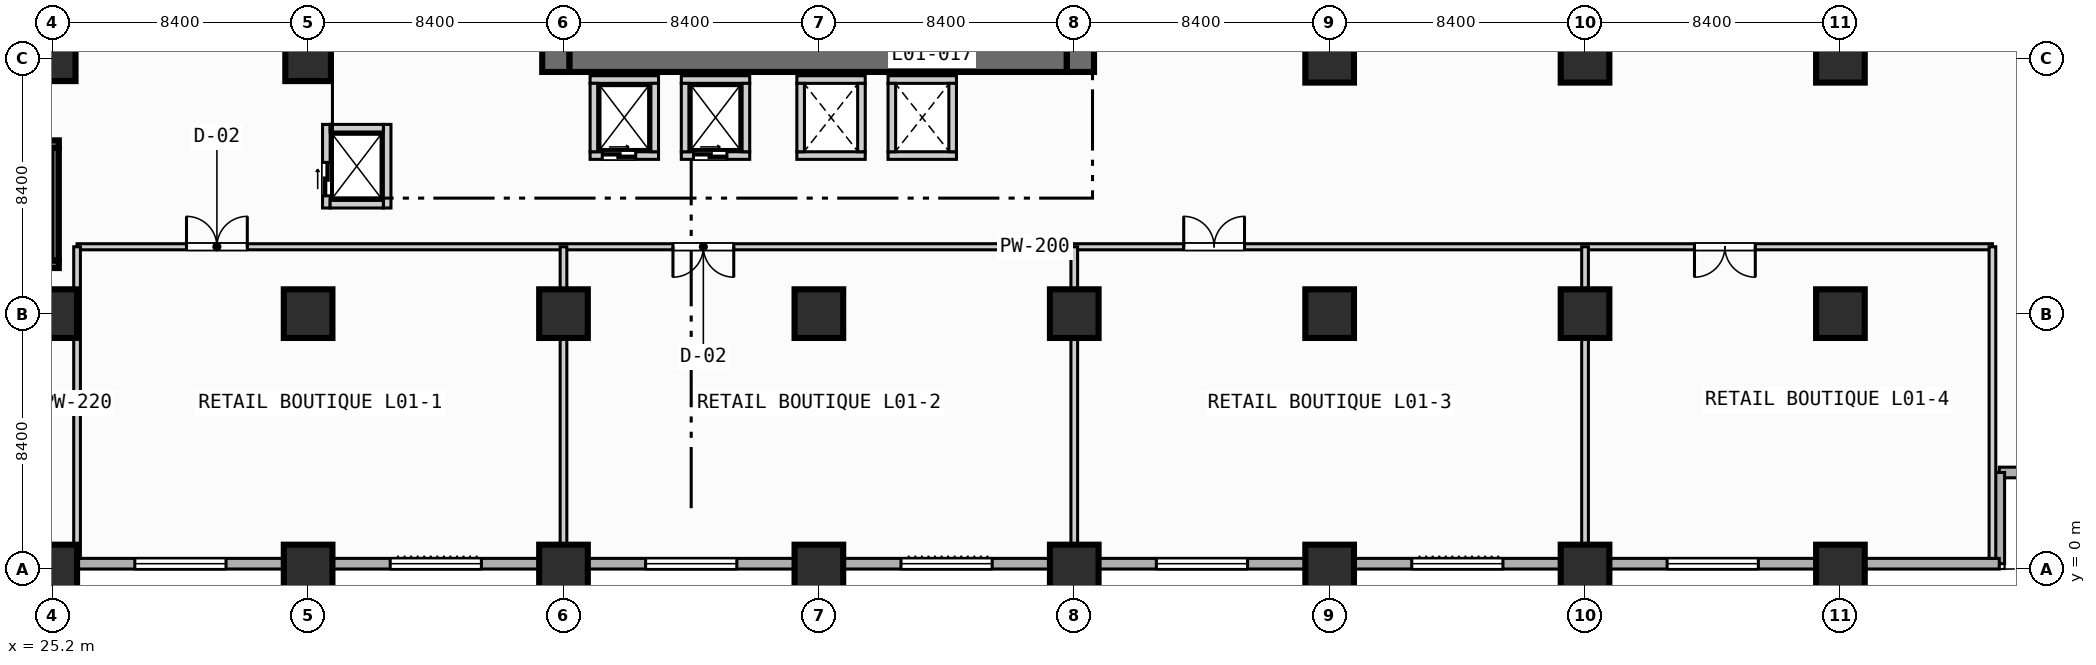
"""IFC4 building model, lengths in metres.
Left out: names, types, materials, properties, quantities, classifications, styles, units other than length and angle.
Written with IfcOpenShell. Run it as: python <this file> out.ifc"""

import sys

from ifc_helpers import new_model, si_unit, direction, frame, frame_2d, origin, origin_2d, place, context, subcontext, project, spatial, rectangle, extrude, element, fill, save


model = new_model("IFC4")
c1 = context("Model", 3, precision=1e-05, world=origin(), true_north=direction((0.0, 1.0)))
c2 = subcontext(c1, "Body", "Model", "MODEL_VIEW")
j1 = project(units=[si_unit("LENGTHUNIT", "METRE"), si_unit("PLANEANGLEUNIT", "RADIAN")], contexts=[c1])
p1 = place(None, origin())
s1 = spatial("IfcSite", under=j1, at=p1, CompositionType="ELEMENT")
p2 = place(p1, origin())
s2 = spatial("IfcBuilding", under=s1, at=p2, CompositionType="ELEMENT")
p3 = place(p2, frame((0.0, 0.0, 6.0)))
s3 = spatial("IfcBuildingStorey", under=s2, at=p3, CompositionType="ELEMENT", Elevation=6.0)
for number, where, z_axis, x_axis in (
    (1, (41.75, 16.35, 0.0), (0.0, 0.0, 1.0), (0.0, 1.0, 0.0)),
    (2, (59.0, 16.35, 0.0), (0.0, 0.0, 1.0), (0.0, 1.0, 0.0)),
):
    element("IfcWall", number, at=place(p3, frame(where, z_axis=z_axis, x_axis=x_axis)), inside=s3, PredefinedType="SHEAR", context=c2, shape_type="SweptSolid", body=[
        extrude(rectangle(XDim=1.65, YDim=0.9, at=frame_2d((0.825, 0.0))), origin(), (0.0, 0.0, 1.0), 4.45),
    ])
p4 = place(p3, frame((42.2, 16.8, 0.0), z_axis=(0.0, 0.0, 1.0), x_axis=(1.0, 0.0, 0.0)))
e3 = element("IfcWall", 3, at=p4, inside=s3, PredefinedType="SHEAR", context=c2, shape_type="SweptSolid", body=[
    extrude(rectangle(XDim=16.35, YDim=0.9, at=frame_2d((8.175, 0.0))), origin(), (0.0, 0.0, 1.0), 4.45),
])
for number, where, z_axis, x_axis in (
    (4, (16.5, 10.025, 0.0), (0.0, 0.0, 1.0), (1.0, 0.0, 0.0)),
    (5, (16.5, 13.975, 0.0), (0.0, 0.0, 1.0), (1.0, 0.0, 0.0)),
):
    element("IfcWall", number, at=place(p3, frame(where, z_axis=z_axis, x_axis=x_axis)), inside=s3, PredefinedType="SOLIDWALL", context=c2, shape_type="SweptSolid", body=[
        extrude(rectangle(XDim=8.9, YDim=0.25, at=frame_2d((4.45, 0.0))), origin(), (0.0, 0.0, 1.0), 4.45),
    ])
p5 = place(p3, frame((25.275, 10.15, 0.0), z_axis=(0.0, 0.0, 1.0), x_axis=(0.0, 1.0, 0.0)))
e6 = element("IfcWall", 6, at=p5, inside=s3, PredefinedType="SOLIDWALL", context=c2, shape_type="SweptSolid", body=[
    extrude(rectangle(XDim=3.7, YDim=0.25, at=frame_2d((1.85, 0.0))), origin(), (0.0, 0.0, 1.0), 4.45),
])
for number, where, z_axis, x_axis in (
    (7, (25.2, 0.0, 0.0), (0.0, 0.0, 1.0), (1.0, 0.0, 0.0)),
    (8, (25.2, 8.4, 0.0), (0.0, 0.0, 1.0), (1.0, 0.0, 0.0)),
):
    element("IfcColumn", number, at=place(p3, frame(where, z_axis=z_axis, x_axis=x_axis)), inside=s3, PredefinedType="COLUMN", context=c2, shape_type="SweptSolid", body=[
        extrude(rectangle(XDim=1.6, YDim=1.6, at=origin_2d()), origin(), (0.0, 0.0, 1.0), 4.8),
    ])
p6 = place(p3, frame((25.2, 16.8, 0.0), z_axis=(0.0, 0.0, 1.0), x_axis=(1.0, 0.0, 0.0)))
e9 = element("IfcColumn", 9, at=p6, inside=s3, PredefinedType="COLUMN", context=c2, shape_type="SweptSolid", body=[
    extrude(rectangle(XDim=1.5, YDim=1.5, at=origin_2d()), origin(), (0.0, 0.0, 1.0), 4.8),
])
for number, where, z_axis, x_axis in (
    (10, (33.6, 0.0, 0.0), (0.0, 0.0, 1.0), (1.0, 0.0, 0.0)),
    (11, (33.6, 8.4, 0.0), (0.0, 0.0, 1.0), (1.0, 0.0, 0.0)),
):
    element("IfcColumn", number, at=place(p3, frame(where, z_axis=z_axis, x_axis=x_axis)), inside=s3, PredefinedType="COLUMN", context=c2, shape_type="SweptSolid", body=[
        extrude(rectangle(XDim=1.6, YDim=1.6, at=origin_2d()), origin(), (0.0, 0.0, 1.0), 4.8),
    ])
p7 = place(p3, frame((33.6, 16.8, 0.0), z_axis=(0.0, 0.0, 1.0), x_axis=(1.0, 0.0, 0.0)))
e12 = element("IfcColumn", 12, at=p7, inside=s3, PredefinedType="COLUMN", context=c2, shape_type="SweptSolid", body=[
    extrude(rectangle(XDim=1.5, YDim=1.5, at=origin_2d()), origin(), (0.0, 0.0, 1.0), 4.8),
])
for number, where, z_axis, x_axis in (
    (13, (42.0, 0.0, 0.0), (0.0, 0.0, 1.0), (1.0, 0.0, 0.0)),
    (14, (42.0, 8.4, 0.0), (0.0, 0.0, 1.0), (1.0, 0.0, 0.0)),
    (15, (50.4, 0.0, 0.0), (0.0, 0.0, 1.0), (1.0, 0.0, 0.0)),
    (16, (50.4, 8.4, 0.0), (0.0, 0.0, 1.0), (1.0, 0.0, 0.0)),
    (17, (58.8, 0.0, 0.0), (0.0, 0.0, 1.0), (1.0, 0.0, 0.0)),
    (18, (58.8, 8.4, 0.0), (0.0, 0.0, 1.0), (1.0, 0.0, 0.0)),
    (19, (67.2, 0.0, 0.0), (0.0, 0.0, 1.0), (1.0, 0.0, 0.0)),
    (20, (67.2, 8.4, 0.0), (0.0, 0.0, 1.0), (1.0, 0.0, 0.0)),
    (21, (67.2, 16.8, 0.0), (0.0, 0.0, 1.0), (1.0, 0.0, 0.0)),
    (22, (75.6, 0.0, 0.0), (0.0, 0.0, 1.0), (1.0, 0.0, 0.0)),
    (23, (75.6, 8.4, 0.0), (0.0, 0.0, 1.0), (1.0, 0.0, 0.0)),
    (24, (75.6, 16.8, 0.0), (0.0, 0.0, 1.0), (1.0, 0.0, 0.0)),
    (25, (84.0, 0.0, 0.0), (0.0, 0.0, 1.0), (1.0, 0.0, 0.0)),
    (26, (84.0, 8.4, 0.0), (0.0, 0.0, 1.0), (1.0, 0.0, 0.0)),
    (27, (84.0, 16.8, 0.0), (0.0, 0.0, 1.0), (1.0, 0.0, 0.0)),
):
    element("IfcColumn", number, at=place(p3, frame(where, z_axis=z_axis, x_axis=x_axis)), inside=s3, PredefinedType="COLUMN", context=c2, shape_type="SweptSolid", body=[
        extrude(rectangle(XDim=1.6, YDim=1.6, at=origin_2d()), origin(), (0.0, 0.0, 1.0), 4.8),
    ])
for number, where, z_axis, x_axis in (
    (28, (92.225, 3.175, 0.0), (0.0, 0.0, 1.0), (-1.0, 0.0, 0.0)),
    (29, (89.225, 3.175, 0.0), (0.0, 0.0, 1.0), (0.0, -1.0, 0.0)),
):
    element("IfcWall", number, at=place(p3, frame(where, z_axis=z_axis, x_axis=x_axis)), inside=s3, PredefinedType="STANDARD", context=c2, shape_type="SweptSolid", body=[
        extrude(rectangle(XDim=3.0, YDim=0.35, at=frame_2d((1.5, 0.0))), origin(), (0.0, 0.0, 1.0), 4.45),
    ])
p8 = place(p3, frame((89.225, 0.175, 0.0), z_axis=(0.0, 0.0, 1.0), x_axis=(-1.0, 0.0, 0.0)))
e30 = element("IfcWall", 30, at=p8, inside=s3, PredefinedType="STANDARD", context=c2, shape_type="SweptSolid", body=[
    extrude(rectangle(XDim=86.05, YDim=0.35, at=frame_2d((43.025, 0.0))), origin(), (0.0, 0.0, 1.0), 4.45),
])
p9 = place(p8, frame((58.325, 0.0, 0.85)))
e31 = element("IfcOpeningElement", 31, at=p9, cuts=e30, PredefinedType="OPENING", context=c2, shape_type="SweptSolid", body=[
    extrude(rectangle(XDim=3.0, YDim=2.4, at=frame_2d((1.5, 1.2))), frame((0.0, 0.185, 0.0), z_axis=(0.0, -1.0, 0.0), x_axis=(1.0, 0.0, 0.0)), (0.0, 0.0, 1.0), 0.37),
])
p10 = place(p8, frame((49.925, 0.0, 0.85)))
e32 = element("IfcOpeningElement", 32, at=p10, cuts=e30, PredefinedType="OPENING", context=c2, shape_type="SweptSolid", body=[
    extrude(rectangle(XDim=3.0, YDim=2.4, at=frame_2d((1.5, 1.2))), frame((0.0, 0.185, 0.0), z_axis=(0.0, -1.0, 0.0), x_axis=(1.0, 0.0, 0.0)), (0.0, 0.0, 1.0), 0.37),
])
p11 = place(p8, frame((41.525, 0.0, 0.85)))
e33 = element("IfcOpeningElement", 33, at=p11, cuts=e30, PredefinedType="OPENING", context=c2, shape_type="SweptSolid", body=[
    extrude(rectangle(XDim=3.0, YDim=2.4, at=frame_2d((1.5, 1.2))), frame((0.0, 0.185, 0.0), z_axis=(0.0, -1.0, 0.0), x_axis=(1.0, 0.0, 0.0)), (0.0, 0.0, 1.0), 0.37),
])
p12 = place(p8, frame((33.125, 0.0, 0.85)))
e34 = element("IfcOpeningElement", 34, at=p12, cuts=e30, PredefinedType="OPENING", context=c2, shape_type="SweptSolid", body=[
    extrude(rectangle(XDim=3.0, YDim=2.4, at=frame_2d((1.5, 1.2))), frame((0.0, 0.185, 0.0), z_axis=(0.0, -1.0, 0.0), x_axis=(1.0, 0.0, 0.0)), (0.0, 0.0, 1.0), 0.37),
])
p13 = place(p8, frame((24.725, 0.0, 0.85)))
e35 = element("IfcOpeningElement", 35, at=p13, cuts=e30, PredefinedType="OPENING", context=c2, shape_type="SweptSolid", body=[
    extrude(rectangle(XDim=3.0, YDim=2.4, at=frame_2d((1.5, 1.2))), frame((0.0, 0.185, 0.0), z_axis=(0.0, -1.0, 0.0), x_axis=(1.0, 0.0, 0.0)), (0.0, 0.0, 1.0), 0.37),
])
p14 = place(p8, frame((16.325, 0.0, 0.85)))
e36 = element("IfcOpeningElement", 36, at=p14, cuts=e30, PredefinedType="OPENING", context=c2, shape_type="SweptSolid", body=[
    extrude(rectangle(XDim=3.0, YDim=2.4, at=frame_2d((1.5, 1.2))), frame((0.0, 0.185, 0.0), z_axis=(0.0, -1.0, 0.0), x_axis=(1.0, 0.0, 0.0)), (0.0, 0.0, 1.0), 0.37),
])
p15 = place(p8, frame((7.925, 0.0, 0.85)))
e37 = element("IfcOpeningElement", 37, at=p15, cuts=e30, PredefinedType="OPENING", context=c2, shape_type="SweptSolid", body=[
    extrude(rectangle(XDim=3.0, YDim=2.4, at=frame_2d((1.5, 1.2))), frame((0.0, 0.185, 0.0), z_axis=(0.0, -1.0, 0.0), x_axis=(1.0, 0.0, 0.0)), (0.0, 0.0, 1.0), 0.37),
])
p16 = place(p3, frame((34.2, 11.875, 0.0), z_axis=(0.0, 0.0, 1.0), x_axis=(0.0, 1.0, 0.0)))
e38 = element("IfcWall", 38, at=p16, inside=s3, PredefinedType="SOLIDWALL", context=c2, shape_type="SweptSolid", body=[
    extrude(rectangle(XDim=2.75, YDim=0.25, at=frame_2d((1.375, 0.0))), origin(), (0.0, 0.0, 1.0), 4.45),
])
p17 = place(p16, frame((0.4, 0.0, 0.0)))
e39 = element("IfcOpeningElement", 39, at=p17, cuts=e38, PredefinedType="OPENING", context=c2, shape_type="SweptSolid", body=[
    extrude(rectangle(XDim=1.1, YDim=2.15, at=frame_2d((0.55, 1.075))), frame((0.0, 0.135, 0.0), z_axis=(0.0, -1.0, 0.0), x_axis=(1.0, 0.0, 0.0)), (0.0, 0.0, 1.0), 0.27),
])
p18 = place(p3, frame((36.2, 11.875, 0.0), z_axis=(0.0, 0.0, 1.0), x_axis=(0.0, 1.0, 0.0)))
e40 = element("IfcWall", 40, at=p18, inside=s3, PredefinedType="SOLIDWALL", context=c2, shape_type="SweptSolid", body=[
    extrude(rectangle(XDim=2.75, YDim=0.25, at=frame_2d((1.375, 0.0))), origin(), (0.0, 0.0, 1.0), 4.45),
])
for number, where, z_axis, x_axis in (
    (41, (34.325, 12.0, 0.0), (0.0, 0.0, 1.0), (1.0, 0.0, 0.0)),
    (42, (34.325, 14.5, 0.0), (0.0, 0.0, 1.0), (1.0, 0.0, 0.0)),
):
    element("IfcWall", number, at=place(p3, frame(where, z_axis=z_axis, x_axis=x_axis)), inside=s3, PredefinedType="SOLIDWALL", context=c2, shape_type="SweptSolid", body=[
        extrude(rectangle(XDim=1.75, YDim=0.25, at=frame_2d((0.875, 0.0))), origin(), (0.0, 0.0, 1.0), 4.45),
    ])
p19 = place(p3, frame((42.875, 13.6, 0.0), z_axis=(0.0, 0.0, 1.0), x_axis=(1.0, 0.0, 0.0)))
e43 = element("IfcWall", 43, at=p19, inside=s3, PredefinedType="SOLIDWALL", context=c2, shape_type="SweptSolid", body=[
    extrude(rectangle(XDim=2.25, YDim=0.25, at=frame_2d((1.125, 0.0))), origin(), (0.0, 0.0, 1.0), 4.45),
])
p20 = place(p19, frame((0.4, 0.0, 0.0)))
e44 = element("IfcOpeningElement", 44, at=p20, cuts=e43, PredefinedType="OPENING", context=c2, shape_type="SweptSolid", body=[
    extrude(rectangle(XDim=1.1, YDim=2.15, at=frame_2d((0.55, 1.075))), frame((0.0, 0.135, 0.0), z_axis=(0.0, -1.0, 0.0), x_axis=(1.0, 0.0, 0.0)), (0.0, 0.0, 1.0), 0.27),
])
for number, where, z_axis, x_axis in (
    (45, (42.875, 16.1, 0.0), (0.0, 0.0, 1.0), (1.0, 0.0, 0.0)),
    (46, (43.0, 13.725, 0.0), (0.0, 0.0, 1.0), (0.0, 1.0, 0.0)),
    (47, (45.0, 13.725, 0.0), (0.0, 0.0, 1.0), (0.0, 1.0, 0.0)),
):
    element("IfcWall", number, at=place(p3, frame(where, z_axis=z_axis, x_axis=x_axis)), inside=s3, PredefinedType="SOLIDWALL", context=c2, shape_type="SweptSolid", body=[
        extrude(rectangle(XDim=2.25, YDim=0.25, at=frame_2d((1.125, 0.0))), origin(), (0.0, 0.0, 1.0), 4.45),
    ])
p21 = place(p3, frame((45.875, 13.6, 0.0), z_axis=(0.0, 0.0, 1.0), x_axis=(1.0, 0.0, 0.0)))
e48 = element("IfcWall", 48, at=p21, inside=s3, PredefinedType="SOLIDWALL", context=c2, shape_type="SweptSolid", body=[
    extrude(rectangle(XDim=2.25, YDim=0.25, at=frame_2d((1.125, 0.0))), origin(), (0.0, 0.0, 1.0), 4.45),
])
p22 = place(p21, frame((0.4, 0.0, 0.0)))
e49 = element("IfcOpeningElement", 49, at=p22, cuts=e48, PredefinedType="OPENING", context=c2, shape_type="SweptSolid", body=[
    extrude(rectangle(XDim=1.1, YDim=2.15, at=frame_2d((0.55, 1.075))), frame((0.0, 0.135, 0.0), z_axis=(0.0, -1.0, 0.0), x_axis=(1.0, 0.0, 0.0)), (0.0, 0.0, 1.0), 0.27),
])
for number, where, z_axis, x_axis in (
    (50, (45.875, 16.1, 0.0), (0.0, 0.0, 1.0), (1.0, 0.0, 0.0)),
    (51, (46.0, 13.725, 0.0), (0.0, 0.0, 1.0), (0.0, 1.0, 0.0)),
    (52, (48.0, 13.725, 0.0), (0.0, 0.0, 1.0), (0.0, 1.0, 0.0)),
    (53, (49.675, 13.6, 0.0), (0.0, 0.0, 1.0), (1.0, 0.0, 0.0)),
    (54, (49.675, 16.1, 0.0), (0.0, 0.0, 1.0), (1.0, 0.0, 0.0)),
    (55, (49.8, 13.725, 0.0), (0.0, 0.0, 1.0), (0.0, 1.0, 0.0)),
    (56, (51.8, 13.725, 0.0), (0.0, 0.0, 1.0), (0.0, 1.0, 0.0)),
    (57, (52.675, 13.6, 0.0), (0.0, 0.0, 1.0), (1.0, 0.0, 0.0)),
    (58, (52.675, 16.1, 0.0), (0.0, 0.0, 1.0), (1.0, 0.0, 0.0)),
    (59, (52.8, 13.725, 0.0), (0.0, 0.0, 1.0), (0.0, 1.0, 0.0)),
    (60, (54.8, 13.725, 0.0), (0.0, 0.0, 1.0), (0.0, 1.0, 0.0)),
):
    element("IfcWall", number, at=place(p3, frame(where, z_axis=z_axis, x_axis=x_axis)), inside=s3, PredefinedType="SOLIDWALL", context=c2, shape_type="SweptSolid", body=[
        extrude(rectangle(XDim=2.25, YDim=0.25, at=frame_2d((1.125, 0.0))), origin(), (0.0, 0.0, 1.0), 4.45),
    ])
p23 = place(p3, frame((26.0, 10.6, 0.0), z_axis=(0.0, 0.0, 1.0), x_axis=(1.0, 0.0, 0.0)))
e61 = element("IfcWall", 61, at=p23, inside=s3, PredefinedType="PARTITIONING", context=c2, shape_type="SweptSolid", body=[
    extrude(rectangle(XDim=63.0, YDim=0.2, at=frame_2d((31.5, 0.0))), origin(), (0.0, 0.0, 1.0), 4.45),
])
p24 = place(p23, frame((3.6, 0.0, 0.0)))
e62 = element("IfcOpeningElement", 62, at=p24, cuts=e61, PredefinedType="OPENING", context=c2, shape_type="SweptSolid", body=[
    extrude(rectangle(XDim=2.0, YDim=2.15, at=frame_2d((1.0, 1.075))), frame((0.0, 0.11, 0.0), z_axis=(0.0, -1.0, 0.0), x_axis=(1.0, 0.0, 0.0)), (0.0, 0.0, 1.0), 0.22),
])
p25 = place(p23, frame((19.6, 0.0, 0.0)))
e63 = element("IfcOpeningElement", 63, at=p25, cuts=e61, PredefinedType="OPENING", context=c2, shape_type="SweptSolid", body=[
    extrude(rectangle(XDim=2.0, YDim=2.15, at=frame_2d((1.0, 1.075))), frame((0.0, 0.11, 0.0), z_axis=(0.0, -1.0, 0.0), x_axis=(1.0, 0.0, 0.0)), (0.0, 0.0, 1.0), 0.22),
])
p26 = place(p23, frame((36.4, 0.0, 0.0)))
e64 = element("IfcOpeningElement", 64, at=p26, cuts=e61, PredefinedType="OPENING", context=c2, shape_type="SweptSolid", body=[
    extrude(rectangle(XDim=2.0, YDim=2.15, at=frame_2d((1.0, 1.075))), frame((0.0, 0.11, 0.0), z_axis=(0.0, -1.0, 0.0), x_axis=(1.0, 0.0, 0.0)), (0.0, 0.0, 1.0), 0.22),
])
p27 = place(p23, frame((53.2, 0.0, 0.0)))
e65 = element("IfcOpeningElement", 65, at=p27, cuts=e61, PredefinedType="OPENING", context=c2, shape_type="SweptSolid", body=[
    extrude(rectangle(XDim=2.0, YDim=2.15, at=frame_2d((1.0, 1.075))), frame((0.0, 0.11, 0.0), z_axis=(0.0, -1.0, 0.0), x_axis=(1.0, 0.0, 0.0)), (0.0, 0.0, 1.0), 0.22),
])
p28 = place(p3, frame((26.0, 0.35, 0.0), z_axis=(0.0, 0.0, 1.0), x_axis=(0.0, 1.0, 0.0)))
e66 = element("IfcWall", 66, at=p28, inside=s3, PredefinedType="PARTITIONING", context=c2, shape_type="SweptSolid", body=[
    extrude(rectangle(XDim=10.25, YDim=0.22, at=frame_2d((5.125, 0.0))), origin(), (0.0, 0.0, 1.0), 4.45),
])
for number, where, z_axis, x_axis in (
    (67, (42.0, 0.35, 0.0), (0.0, 0.0, 1.0), (0.0, 1.0, 0.0)),
    (68, (58.8, 0.35, 0.0), (0.0, 0.0, 1.0), (0.0, 1.0, 0.0)),
    (69, (75.6, 0.35, 0.0), (0.0, 0.0, 1.0), (0.0, 1.0, 0.0)),
):
    element("IfcWall", number, at=place(p3, frame(where, z_axis=z_axis, x_axis=x_axis)), inside=s3, PredefinedType="PARTITIONING", context=c2, shape_type="SweptSolid", body=[
        extrude(rectangle(XDim=10.25, YDim=0.22, at=frame_2d((5.125, 0.0))), origin(), (0.0, 0.0, 1.0), 3.6),
    ])
p29 = place(p3, frame((89.0, 0.35, 0.0), z_axis=(0.0, 0.0, 1.0), x_axis=(0.0, 1.0, 0.0)))
e70 = element("IfcWall", 70, at=p29, inside=s3, PredefinedType="PARTITIONING", context=c2, shape_type="SweptSolid", body=[
    extrude(rectangle(XDim=10.25, YDim=0.22, at=frame_2d((5.125, 0.0))), origin(), (0.0, 0.0, 1.0), 4.45),
])
p30 = place(p9, origin())
e71 = element("IfcWindow", 71, at=p30, inside=s3, PartitioningType="SINGLE_PANEL", PredefinedType="WINDOW", context=c2, shape_type="SweptSolid", body=[
    extrude(rectangle(XDim=3.0, YDim=2.4, at=frame_2d((1.5, 1.2))), frame((0.0, 0.03, 0.0), z_axis=(0.0, -1.0, 0.0), x_axis=(1.0, 0.0, 0.0)), (0.0, 0.0, 1.0), 0.06),
])
fill(e31, e71)
p31 = place(p10, origin())
e72 = element("IfcWindow", 72, at=p31, inside=s3, PartitioningType="SINGLE_PANEL", PredefinedType="WINDOW", context=c2, shape_type="SweptSolid", body=[
    extrude(rectangle(XDim=3.0, YDim=2.4, at=frame_2d((1.5, 1.2))), frame((0.0, 0.03, 0.0), z_axis=(0.0, -1.0, 0.0), x_axis=(1.0, 0.0, 0.0)), (0.0, 0.0, 1.0), 0.06),
])
fill(e32, e72)
p32 = place(p11, origin())
e73 = element("IfcWindow", 73, at=p32, inside=s3, PartitioningType="SINGLE_PANEL", PredefinedType="WINDOW", context=c2, shape_type="SweptSolid", body=[
    extrude(rectangle(XDim=3.0, YDim=2.4, at=frame_2d((1.5, 1.2))), frame((0.0, 0.03, 0.0), z_axis=(0.0, -1.0, 0.0), x_axis=(1.0, 0.0, 0.0)), (0.0, 0.0, 1.0), 0.06),
])
fill(e33, e73)
p33 = place(p12, origin())
e74 = element("IfcWindow", 74, at=p33, inside=s3, PartitioningType="SINGLE_PANEL", PredefinedType="WINDOW", context=c2, shape_type="SweptSolid", body=[
    extrude(rectangle(XDim=3.0, YDim=2.4, at=frame_2d((1.5, 1.2))), frame((0.0, 0.03, 0.0), z_axis=(0.0, -1.0, 0.0), x_axis=(1.0, 0.0, 0.0)), (0.0, 0.0, 1.0), 0.06),
])
fill(e34, e74)
p34 = place(p13, origin())
e75 = element("IfcWindow", 75, at=p34, inside=s3, PartitioningType="SINGLE_PANEL", PredefinedType="WINDOW", context=c2, shape_type="SweptSolid", body=[
    extrude(rectangle(XDim=3.0, YDim=2.4, at=frame_2d((1.5, 1.2))), frame((0.0, 0.03, 0.0), z_axis=(0.0, -1.0, 0.0), x_axis=(1.0, 0.0, 0.0)), (0.0, 0.0, 1.0), 0.06),
])
fill(e35, e75)
p35 = place(p14, origin())
e76 = element("IfcWindow", 76, at=p35, inside=s3, PartitioningType="SINGLE_PANEL", PredefinedType="WINDOW", context=c2, shape_type="SweptSolid", body=[
    extrude(rectangle(XDim=3.0, YDim=2.4, at=frame_2d((1.5, 1.2))), frame((0.0, 0.03, 0.0), z_axis=(0.0, -1.0, 0.0), x_axis=(1.0, 0.0, 0.0)), (0.0, 0.0, 1.0), 0.06),
])
fill(e36, e76)
p36 = place(p15, origin())
e77 = element("IfcWindow", 77, at=p36, inside=s3, PartitioningType="SINGLE_PANEL", PredefinedType="WINDOW", context=c2, shape_type="SweptSolid", body=[
    extrude(rectangle(XDim=3.0, YDim=2.4, at=frame_2d((1.5, 1.2))), frame((0.0, 0.03, 0.0), z_axis=(0.0, -1.0, 0.0), x_axis=(1.0, 0.0, 0.0)), (0.0, 0.0, 1.0), 0.06),
])
fill(e37, e77)
p37 = place(p17, origin())
e78 = element("IfcDoor", 78, at=p37, inside=s3, OperationType="SLIDING_TO_LEFT", PredefinedType="DOOR", context=c2, shape_type="SweptSolid", body=[
    extrude(rectangle(XDim=1.1, YDim=2.15, at=frame_2d((0.55, 1.075))), frame((0.0, 0.025, 0.0), z_axis=(0.0, -1.0, 0.0), x_axis=(1.0, 0.0, 0.0)), (0.0, 0.0, 1.0), 0.05),
])
fill(e39, e78)
p38 = place(p20, origin())
e79 = element("IfcDoor", 79, at=p38, inside=s3, OperationType="SLIDING_TO_LEFT", PredefinedType="DOOR", context=c2, shape_type="SweptSolid", body=[
    extrude(rectangle(XDim=1.1, YDim=2.15, at=frame_2d((0.55, 1.075))), frame((0.0, 0.025, 0.0), z_axis=(0.0, -1.0, 0.0), x_axis=(1.0, 0.0, 0.0)), (0.0, 0.0, 1.0), 0.05),
])
fill(e44, e79)
p39 = place(p22, origin())
e80 = element("IfcDoor", 80, at=p39, inside=s3, OperationType="SLIDING_TO_LEFT", PredefinedType="DOOR", context=c2, shape_type="SweptSolid", body=[
    extrude(rectangle(XDim=1.1, YDim=2.15, at=frame_2d((0.55, 1.075))), frame((0.0, 0.025, 0.0), z_axis=(0.0, -1.0, 0.0), x_axis=(1.0, 0.0, 0.0)), (0.0, 0.0, 1.0), 0.05),
])
fill(e49, e80)
p40 = place(p24, origin())
e81 = element("IfcDoor", 81, at=p40, inside=s3, OperationType="SINGLE_SWING_LEFT", PredefinedType="DOOR", context=c2, shape_type="SweptSolid", body=[
    extrude(rectangle(XDim=2.0, YDim=2.15, at=frame_2d((1.0, 1.075))), frame((0.0, 0.025, 0.0), z_axis=(0.0, -1.0, 0.0), x_axis=(1.0, 0.0, 0.0)), (0.0, 0.0, 1.0), 0.05),
])
fill(e62, e81)
p41 = place(p25, origin())
e82 = element("IfcDoor", 82, at=p41, inside=s3, OperationType="SINGLE_SWING_RIGHT", PredefinedType="DOOR", context=c2, shape_type="SweptSolid", body=[
    extrude(rectangle(XDim=2.0, YDim=2.15, at=frame_2d((1.0, 1.075))), frame((0.0, 0.025, 0.0), z_axis=(0.0, -1.0, 0.0), x_axis=(1.0, 0.0, 0.0)), (0.0, 0.0, 1.0), 0.05),
])
fill(e63, e82)
p42 = place(p26, origin())
e83 = element("IfcDoor", 83, at=p42, inside=s3, OperationType="SINGLE_SWING_LEFT", PredefinedType="DOOR", context=c2, shape_type="SweptSolid", body=[
    extrude(rectangle(XDim=2.0, YDim=2.15, at=frame_2d((1.0, 1.075))), frame((0.0, 0.025, 0.0), z_axis=(0.0, -1.0, 0.0), x_axis=(1.0, 0.0, 0.0)), (0.0, 0.0, 1.0), 0.05),
])
fill(e64, e83)
p43 = place(p27, origin())
e84 = element("IfcDoor", 84, at=p43, inside=s3, OperationType="SINGLE_SWING_RIGHT", PredefinedType="DOOR", context=c2, shape_type="SweptSolid", body=[
    extrude(rectangle(XDim=2.0, YDim=2.15, at=frame_2d((1.0, 1.075))), frame((0.0, 0.025, 0.0), z_axis=(0.0, -1.0, 0.0), x_axis=(1.0, 0.0, 0.0)), (0.0, 0.0, 1.0), 0.05),
])
fill(e65, e84)
save(model, sys.argv[1])
